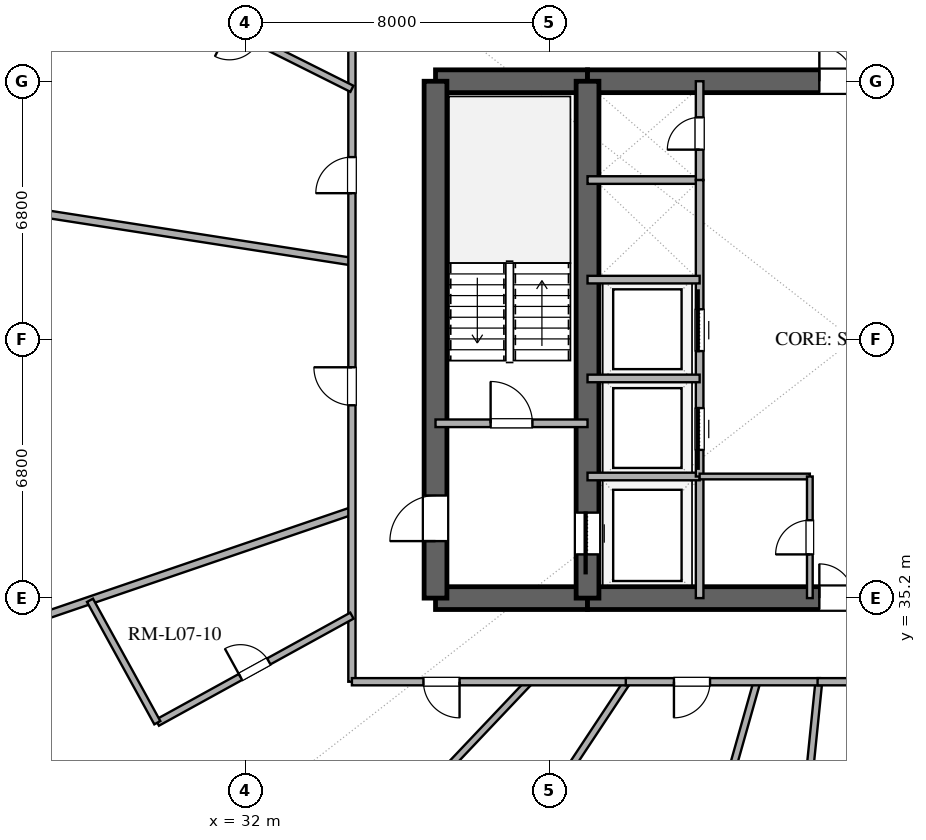
"""IFC4 building model, lengths in metres.
Left out: names, types, materials, properties, quantities, classifications, styles, units other than length and angle.
Written with IfcOpenShell. Run it as: python <this file> out.ifc"""

import sys

from ifc_helpers import new_model, si_unit, direction, frame, frame_2d, origin, place, context, subcontext, project, spatial, rectangle, extrude, element, fill, save


model = new_model("IFC4")
c1 = context("Model", 3, precision=1e-05, world=origin(), true_north=direction((0.0, 1.0)))
c2 = subcontext(c1, "Body", "Model", "MODEL_VIEW")
j1 = project(units=[si_unit("LENGTHUNIT", "METRE"), si_unit("PLANEANGLEUNIT", "RADIAN")], contexts=[c1])
p1 = place(None, origin())
s1 = spatial("IfcSite", under=j1, at=p1, CompositionType="ELEMENT")
p2 = place(p1, origin())
s2 = spatial("IfcBuilding", under=s1, at=p2, CompositionType="ELEMENT")
p3 = place(p2, frame((0.0, 0.0, 35.4)))
s3 = spatial("IfcBuildingStorey", under=s2, at=p3, CompositionType="ELEMENT", Elevation=35.4)
p4 = place(p3, frame((37.0, 35.2, 0.0), z_axis=(0.0, 0.0, 1.0), x_axis=(1.0, 0.0, 0.0)))
e1 = element("IfcWall", 1, at=p4, inside=s3, PredefinedType="SHEAR", context=c2, shape_type="SweptSolid", body=[
    extrude(rectangle(XDim=4.0, YDim=0.6, at=frame_2d((2.0, 0.0))), origin(), (0.0, 0.0, 1.0), 3.38),
])
p5 = place(p3, frame((41.0, 35.2, 0.0), z_axis=(0.0, 0.0, 1.0), x_axis=(1.0, 0.0, 0.0)))
e2 = element("IfcWall", 2, at=p5, inside=s3, PredefinedType="SHEAR", context=c2, shape_type="SweptSolid", body=[
    extrude(rectangle(XDim=14.0, YDim=0.6, at=frame_2d((7.0, 0.0))), origin(), (0.0, 0.0, 1.0), 3.38),
])
p6 = place(p5, frame((6.1, 0.0, 0.0)))
e3 = element("IfcOpeningElement", 3, at=p6, cuts=e2, PredefinedType="OPENING", context=c2, shape_type="SweptSolid", body=[
    extrude(rectangle(XDim=1.8, YDim=2.25, at=frame_2d((0.9, 1.125))), frame((0.0, 0.31, 0.0), z_axis=(0.0, -1.0, 0.0), x_axis=(1.0, 0.0, 0.0)), (0.0, 0.0, 1.0), 0.62),
])
p7 = place(p3, frame((37.0, 48.8, 0.0), z_axis=(0.0, 0.0, 1.0), x_axis=(1.0, 0.0, 0.0)))
e4 = element("IfcWall", 4, at=p7, inside=s3, PredefinedType="SHEAR", context=c2, shape_type="SweptSolid", body=[
    extrude(rectangle(XDim=4.0, YDim=0.6, at=frame_2d((2.0, 0.0))), origin(), (0.0, 0.0, 1.0), 3.38),
])
p8 = place(p3, frame((41.0, 48.8, 0.0), z_axis=(0.0, 0.0, 1.0), x_axis=(1.0, 0.0, 0.0)))
e5 = element("IfcWall", 5, at=p8, inside=s3, PredefinedType="SHEAR", context=c2, shape_type="SweptSolid", body=[
    extrude(rectangle(XDim=14.0, YDim=0.6, at=frame_2d((7.0, 0.0))), origin(), (0.0, 0.0, 1.0), 3.38),
])
p9 = place(p8, frame((6.1, 0.0, 0.0)))
e6 = element("IfcOpeningElement", 6, at=p9, cuts=e5, PredefinedType="OPENING", context=c2, shape_type="SweptSolid", body=[
    extrude(rectangle(XDim=1.8, YDim=2.25, at=frame_2d((0.9, 1.125))), frame((0.0, 0.31, 0.0), z_axis=(0.0, -1.0, 0.0), x_axis=(1.0, 0.0, 0.0)), (0.0, 0.0, 1.0), 0.62),
])
p10 = place(p3, frame((37.0, 35.2, 0.0), z_axis=(0.0, 0.0, 1.0), x_axis=(0.0, 1.0, 0.0)))
e7 = element("IfcWall", 7, at=p10, inside=s3, PredefinedType="SHEAR", context=c2, shape_type="SweptSolid", body=[
    extrude(rectangle(XDim=13.6, YDim=0.6, at=frame_2d((6.8, 0.0))), origin(), (0.0, 0.0, 1.0), 3.38),
])
p11 = place(p10, frame((1.5, 0.0, 0.0)))
e8 = element("IfcOpeningElement", 8, at=p11, cuts=e7, PredefinedType="OPENING", context=c2, shape_type="SweptSolid", body=[
    extrude(rectangle(XDim=1.2, YDim=2.15, at=frame_2d((0.6, 1.075))), frame((0.0, 0.31, 0.0), z_axis=(0.0, -1.0, 0.0), x_axis=(1.0, 0.0, 0.0)), (0.0, 0.0, 1.0), 0.62),
])
p12 = place(p3, frame((41.0, 35.2, 0.0), z_axis=(0.0, 0.0, 1.0), x_axis=(0.0, 1.0, 0.0)))
e9 = element("IfcWall", 9, at=p12, inside=s3, PredefinedType="SHEAR", context=c2, shape_type="SweptSolid", body=[
    extrude(rectangle(XDim=13.6, YDim=0.6, at=frame_2d((6.8, 0.0))), origin(), (0.0, 0.0, 1.0), 3.38),
])
p13 = place(p12, frame((1.15, 0.0, 0.0)))
e10 = element("IfcOpeningElement", 10, at=p13, cuts=e9, PredefinedType="OPENING", context=c2, shape_type="SweptSolid", body=[
    extrude(rectangle(XDim=1.1, YDim=2.2, at=frame_2d((0.55, 1.1))), frame((0.0, 0.31, 0.0), z_axis=(0.0, -1.0, 0.0), x_axis=(1.0, 0.0, 0.0)), (0.0, 0.0, 1.0), 0.62),
])
p14 = place(p3, frame((37.0, 39.8, 0.0), z_axis=(0.0, 0.0, 1.0), x_axis=(1.0, 0.0, 0.0)))
e11 = element("IfcWall", 11, at=p14, inside=s3, PredefinedType="SOLIDWALL", context=c2, shape_type="SweptSolid", body=[
    extrude(rectangle(XDim=4.0, YDim=0.2, at=frame_2d((2.0, 0.0))), origin(), (0.0, 0.0, 1.0), 2.74),
])
p15 = place(p14, frame((1.45, 0.0, 0.0)))
e12 = element("IfcOpeningElement", 12, at=p15, cuts=e11, PredefinedType="OPENING", context=c2, shape_type="SweptSolid", body=[
    extrude(rectangle(XDim=1.1, YDim=2.15, at=frame_2d((0.55, 1.075))), frame((0.0, 0.11, 0.0), z_axis=(0.0, -1.0, 0.0), x_axis=(1.0, 0.0, 0.0)), (0.0, 0.0, 1.0), 0.22),
])
p16 = place(p3, frame((43.95, 35.2, 0.0), z_axis=(0.0, 0.0, 1.0), x_axis=(0.0, 1.0, 0.0)))
e13 = element("IfcWall", 13, at=p16, inside=s3, PredefinedType="SOLIDWALL", context=c2, shape_type="SweptSolid", body=[
    extrude(rectangle(XDim=3.2, YDim=0.2, at=frame_2d((1.6, 0.0))), origin(), (0.0, 0.0, 1.0), 2.74),
])
for number, where, z_axis, x_axis in (
    (14, (41.0, 38.4, 0.0), (0.0, 0.0, 1.0), (1.0, 0.0, 0.0)),
    (15, (41.0, 46.2, 0.0), (0.0, 0.0, 1.0), (1.0, 0.0, 0.0)),
):
    element("IfcWall", number, at=place(p3, frame(where, z_axis=z_axis, x_axis=x_axis)), inside=s3, PredefinedType="SOLIDWALL", context=c2, shape_type="SweptSolid", body=[
        extrude(rectangle(XDim=2.95, YDim=0.2, at=frame_2d((1.475, 0.0))), origin(), (0.0, 0.0, 1.0), 2.74),
    ])
p17 = place(p3, frame((43.95, 46.2, 0.0), z_axis=(0.0, 0.0, 1.0), x_axis=(0.0, 1.0, 0.0)))
e16 = element("IfcWall", 16, at=p17, inside=s3, PredefinedType="SOLIDWALL", context=c2, shape_type="SweptSolid", body=[
    extrude(rectangle(XDim=2.6, YDim=0.2, at=frame_2d((1.3, 0.0))), origin(), (0.0, 0.0, 1.0), 2.74),
])
p18 = place(p17, frame((0.8, 0.0, 0.0)))
e17 = element("IfcOpeningElement", 17, at=p18, cuts=e16, PredefinedType="OPENING", context=c2, shape_type="SweptSolid", body=[
    extrude(rectangle(XDim=0.85, YDim=2.15, at=frame_2d((0.425, 1.075))), frame((0.0, 0.11, 0.0), z_axis=(0.0, -1.0, 0.0), x_axis=(1.0, 0.0, 0.0)), (0.0, 0.0, 1.0), 0.22),
])
p19 = place(p3, frame((43.95, 38.4, 0.0), z_axis=(0.0, 0.0, 1.0), x_axis=(0.0, 1.0, 0.0)))
e18 = element("IfcWall", 18, at=p19, inside=s3, PredefinedType="SOLIDWALL", context=c2, shape_type="SweptSolid", body=[
    extrude(rectangle(XDim=7.8, YDim=0.2, at=frame_2d((3.9, 0.0))), origin(), (0.0, 0.0, 1.0), 2.74),
])
p20 = place(p19, frame((0.7, 0.0, 0.0)))
e19 = element("IfcOpeningElement", 19, at=p20, cuts=e18, PredefinedType="OPENING", context=c2, shape_type="SweptSolid", body=[
    extrude(rectangle(XDim=1.1, YDim=2.2, at=frame_2d((0.55, 1.1))), frame((0.0, 0.11, 0.0), z_axis=(0.0, -1.0, 0.0), x_axis=(1.0, 0.0, 0.0)), (0.0, 0.0, 1.0), 0.22),
])
p21 = place(p19, frame((3.3, 0.0, 0.0)))
e20 = element("IfcOpeningElement", 20, at=p21, cuts=e18, PredefinedType="OPENING", context=c2, shape_type="SweptSolid", body=[
    extrude(rectangle(XDim=1.1, YDim=2.2, at=frame_2d((0.55, 1.1))), frame((0.0, 0.11, 0.0), z_axis=(0.0, -1.0, 0.0), x_axis=(1.0, 0.0, 0.0)), (0.0, 0.0, 1.0), 0.22),
])
for number, where, z_axis, x_axis in (
    (21, (41.0, 40.98, 0.0), (0.0, 0.0, 1.0), (1.0, 0.0, 0.0)),
    (22, (41.0, 43.58, 0.0), (0.0, 0.0, 1.0), (1.0, 0.0, 0.0)),
):
    element("IfcWall", number, at=place(p3, frame(where, z_axis=z_axis, x_axis=x_axis)), inside=s3, PredefinedType="SOLIDWALL", context=c2, shape_type="SweptSolid", body=[
        extrude(rectangle(XDim=2.95, YDim=0.2, at=frame_2d((1.475, 0.0))), origin(), (0.0, 0.0, 1.0), 2.74),
    ])
p22 = place(p3, frame((43.95, 38.4, 0.0), z_axis=(0.0, 0.0, 1.0), x_axis=(1.0, 0.0, 0.0)))
e23 = element("IfcWall", 23, at=p22, inside=s3, PredefinedType="PARTITIONING", context=c2, shape_type="SweptSolid", body=[
    extrude(rectangle(XDim=2.9, YDim=0.15, at=frame_2d((1.45, 0.0))), origin(), (0.0, 0.0, 1.0), 2.74),
])
p23 = place(p3, frame((46.85, 35.2, 0.0), z_axis=(0.0, 0.0, 1.0), x_axis=(0.0, 1.0, 0.0)))
e24 = element("IfcWall", 24, at=p23, inside=s3, PredefinedType="PARTITIONING", context=c2, shape_type="SweptSolid", body=[
    extrude(rectangle(XDim=3.2, YDim=0.15, at=frame_2d((1.6, 0.0))), origin(), (0.0, 0.0, 1.0), 2.74),
])
p24 = place(p23, frame((1.15, 0.0, 0.0)))
e25 = element("IfcOpeningElement", 25, at=p24, cuts=e24, PredefinedType="OPENING", context=c2, shape_type="SweptSolid", body=[
    extrude(rectangle(XDim=0.9, YDim=2.15, at=frame_2d((0.45, 1.075))), frame((0.0, 0.085, 0.0), z_axis=(0.0, -1.0, 0.0), x_axis=(1.0, 0.0, 0.0)), (0.0, 0.0, 1.0), 0.17),
])
p25 = place(p3, frame((18.253, 46.63, 0.0), z_axis=(0.0, 0.0, 1.0), x_axis=(0.988105936892, -0.153774697134, 0.0)))
e26 = element("IfcWall", 26, at=p25, inside=s3, PredefinedType="PARTITIONING", context=c2, shape_type="SweptSolid", body=[
    extrude(rectangle(XDim=16.747, YDim=0.2, at=frame_2d((8.373, 0.0))), origin(), (0.0, 0.0, 1.0), 2.74),
])
p26 = place(p3, frame((34.8, 37.494, 0.0), z_axis=(0.0, 0.0, 1.0), x_axis=(-0.946390715793, -0.32302416792, 0.0)))
e27 = element("IfcWall", 27, at=p26, inside=s3, PredefinedType="PARTITIONING", context=c2, shape_type="SweptSolid", body=[
    extrude(rectangle(XDim=15.952, YDim=0.2, at=frame_2d((7.976, 0.0))), origin(), (0.0, 0.0, 1.0), 2.74),
])
p27 = place(p3, frame((42.045, 33.0, 0.0), z_axis=(0.0, 0.0, 1.0), x_axis=(-0.551832909025, -0.833954699319, 0.0)))
e28 = element("IfcWall", 28, at=p27, inside=s3, PredefinedType="PLUMBINGWALL", context=c2, shape_type="SweptSolid", body=[
    extrude(rectangle(XDim=6.905, YDim=0.18, at=frame_2d((3.452, 0.0))), origin(), (0.0, 0.0, 1.0), 2.74),
])
p28 = place(p27, frame((3.027, 0.0, 0.0)))
e29 = element("IfcOpeningElement", 29, at=p28, cuts=e28, PredefinedType="OPENING", context=c2, shape_type="SweptSolid", body=[
    extrude(rectangle(XDim=0.85, YDim=2.1, at=frame_2d((0.425, 1.05))), frame((0.0, 0.1, 0.0), z_axis=(0.0, -1.0, 0.0), x_axis=(1.0, 0.0, 0.0)), (0.0, 0.0, 1.0), 0.2),
])
p29 = place(p3, frame((47.086, 33.0, 0.0), z_axis=(0.0, 0.0, 1.0), x_axis=(-0.101019373019, -0.994884458756, 0.0)))
e30 = element("IfcWall", 30, at=p29, inside=s3, PredefinedType="PLUMBINGWALL", context=c2, shape_type="SweptSolid", body=[
    extrude(rectangle(XDim=6.714, YDim=0.18, at=frame_2d((3.357, 0.0))), origin(), (0.0, 0.0, 1.0), 2.74),
])
p30 = place(p29, frame((2.932, 0.0, 0.0)))
e31 = element("IfcOpeningElement", 31, at=p30, cuts=e30, PredefinedType="OPENING", context=c2, shape_type="SweptSolid", body=[
    extrude(rectangle(XDim=0.85, YDim=2.1, at=frame_2d((0.425, 1.05))), frame((0.0, 0.1, 0.0), z_axis=(0.0, -1.0, 0.0), x_axis=(1.0, 0.0, 0.0)), (0.0, 0.0, 1.0), 0.2),
])
p31 = place(p3, frame((43.651, 26.601, 0.0), z_axis=(0.0, 0.0, 1.0), x_axis=(0.271761873698, 0.962364527611, 0.0)))
e32 = element("IfcWall", 32, at=p31, inside=s3, PredefinedType="PLUMBINGWALL", context=c2, shape_type="SweptSolid", body=[
    extrude(rectangle(XDim=6.65, YDim=0.18, at=frame_2d((3.325, 0.0))), origin(), (0.0, 0.0, 1.0), 2.74),
])
p32 = place(p3, frame((34.8, 33.0, 0.0), z_axis=(0.0, 0.0, 1.0), x_axis=(0.0, 1.0, 0.0)))
e33 = element("IfcWall", 33, at=p32, inside=s3, PredefinedType="PARTITIONING", context=c2, shape_type="SweptSolid", body=[
    extrude(rectangle(XDim=18.0, YDim=0.19, at=frame_2d((9.0, 0.0))), origin(), (0.0, 0.0, 1.0), 2.74),
])
p33 = place(p32, frame((7.274, 0.0, 0.0)))
e34 = element("IfcOpeningElement", 34, at=p33, cuts=e33, PredefinedType="OPENING", context=c2, shape_type="SweptSolid", body=[
    extrude(rectangle(XDim=1.0, YDim=2.2, at=frame_2d((0.5, 1.1))), frame((0.0, 0.105, 0.0), z_axis=(0.0, -1.0, 0.0), x_axis=(1.0, 0.0, 0.0)), (0.0, 0.0, 1.0), 0.21),
])
p34 = place(p32, frame((12.854, 0.0, 0.0)))
e35 = element("IfcOpeningElement", 35, at=p34, cuts=e33, PredefinedType="OPENING", context=c2, shape_type="SweptSolid", body=[
    extrude(rectangle(XDim=0.95, YDim=2.15, at=frame_2d((0.475, 1.075))), frame((0.0, 0.105, 0.0), z_axis=(0.0, -1.0, 0.0), x_axis=(1.0, 0.0, 0.0)), (0.0, 0.0, 1.0), 0.21),
])
p35 = place(p3, frame((34.8, 48.601, 0.0), z_axis=(0.0, 0.0, 1.0), x_axis=(-0.894404156958, 0.447259660617, 0.0)))
e36 = element("IfcWall", 36, at=p35, inside=s3, PredefinedType="PLUMBINGWALL", context=c2, shape_type="SweptSolid", body=[
    extrude(rectangle(XDim=6.36, YDim=0.18, at=frame_2d((3.18, 0.0))), origin(), (0.0, 0.0, 1.0), 2.74),
])
p36 = place(p35, frame((2.755, 0.0, 0.0)))
e37 = element("IfcOpeningElement", 37, at=p36, cuts=e36, PredefinedType="OPENING", context=c2, shape_type="SweptSolid", body=[
    extrude(rectangle(XDim=0.85, YDim=2.1, at=frame_2d((0.425, 1.05))), frame((0.0, 0.1, 0.0), z_axis=(0.0, -1.0, 0.0), x_axis=(1.0, 0.0, 0.0)), (0.0, 0.0, 1.0), 0.2),
])
p37 = place(p3, frame((29.679, 31.922, 0.0), z_axis=(0.0, 0.0, 1.0), x_axis=(0.876185038284, 0.481974873503, 0.0)))
e38 = element("IfcWall", 38, at=p37, inside=s3, PredefinedType="PLUMBINGWALL", context=c2, shape_type="SweptSolid", body=[
    extrude(rectangle(XDim=5.844, YDim=0.18, at=frame_2d((2.922, 0.0))), origin(), (0.0, 0.0, 1.0), 2.74),
])
p38 = place(p37, frame((2.497, 0.0, 0.0)))
e39 = element("IfcOpeningElement", 39, at=p38, cuts=e38, PredefinedType="OPENING", context=c2, shape_type="SweptSolid", body=[
    extrude(rectangle(XDim=0.85, YDim=2.1, at=frame_2d((0.425, 1.05))), frame((0.0, 0.1, 0.0), z_axis=(0.0, -1.0, 0.0), x_axis=(1.0, 0.0, 0.0)), (0.0, 0.0, 1.0), 0.2),
])
p39 = place(p3, frame((35.64, 28.958, 0.0), z_axis=(0.0, 0.0, 1.0), x_axis=(0.687867465085, 0.725836311077, 0.0)))
e40 = element("IfcWall", 40, at=p39, inside=s3, PredefinedType="PLUMBINGWALL", context=c2, shape_type="SweptSolid", body=[
    extrude(rectangle(XDim=5.568, YDim=0.18, at=frame_2d((2.784, 0.0))), origin(), (0.0, 0.0, 1.0), 2.74),
])
p40 = place(p3, frame((42.083, 33.0, 0.0), z_axis=(0.0, 0.0, 1.0), x_axis=(-1.0, 0.0, 0.0)))
e41 = element("IfcWall", 41, at=p40, inside=s3, PredefinedType="PARTITIONING", context=c2, shape_type="SweptSolid", body=[
    extrude(rectangle(XDim=7.283, YDim=0.19, at=frame_2d((3.642, 0.0))), origin(), (0.0, 0.0, 1.0), 2.74),
])
p41 = place(p40, frame((4.451, 0.0, 0.0)))
e42 = element("IfcOpeningElement", 42, at=p41, cuts=e41, PredefinedType="OPENING", context=c2, shape_type="SweptSolid", body=[
    extrude(rectangle(XDim=0.95, YDim=2.15, at=frame_2d((0.475, 1.075))), frame((0.0, 0.105, 0.0), z_axis=(0.0, -1.0, 0.0), x_axis=(1.0, 0.0, 0.0)), (0.0, 0.0, 1.0), 0.21),
])
p42 = place(p3, frame((27.908, 35.142, 0.0), z_axis=(0.0, 0.0, 1.0), x_axis=(0.481967195945, -0.876189261537, 0.0)))
e43 = element("IfcWall", 43, at=p42, inside=s3, PredefinedType="PLUMBINGWALL", context=c2, shape_type="SweptSolid", body=[
    extrude(rectangle(XDim=3.676, YDim=0.18, at=frame_2d((1.838, 0.0))), origin(), (0.0, 0.0, 1.0), 2.74),
])
p43 = place(p3, frame((47.118, 33.0, 0.0), z_axis=(0.0, 0.0, 1.0), x_axis=(-1.0, 0.0, 0.0)))
e44 = element("IfcWall", 44, at=p43, inside=s3, PredefinedType="PARTITIONING", context=c2, shape_type="SweptSolid", body=[
    extrude(rectangle(XDim=5.112, YDim=0.19, at=frame_2d((2.556, 0.0))), origin(), (0.0, 0.0, 1.0), 2.74),
])
p44 = place(p43, frame((2.894, 0.0, 0.0)))
e45 = element("IfcOpeningElement", 45, at=p44, cuts=e44, PredefinedType="OPENING", context=c2, shape_type="SweptSolid", body=[
    extrude(rectangle(XDim=0.95, YDim=2.15, at=frame_2d((0.475, 1.075))), frame((0.0, 0.105, 0.0), z_axis=(0.0, -1.0, 0.0), x_axis=(1.0, 0.0, 0.0)), (0.0, 0.0, 1.0), 0.21),
])
p45 = place(p3, frame((49.933, 33.0, 0.0), z_axis=(0.0, 0.0, 1.0), x_axis=(-1.0, 0.0, 0.0)))
e46 = element("IfcWall", 46, at=p45, inside=s3, PredefinedType="PARTITIONING", context=c2, shape_type="SweptSolid", body=[
    extrude(rectangle(XDim=2.879, YDim=0.19, at=frame_2d((1.44, 0.0))), origin(), (0.0, 0.0, 1.0), 2.74),
])
p46 = place(p45, frame((0.965, 0.0, 0.0)))
e47 = element("IfcOpeningElement", 47, at=p46, cuts=e46, PredefinedType="OPENING", context=c2, shape_type="SweptSolid", body=[
    extrude(rectangle(XDim=0.95, YDim=2.15, at=frame_2d((0.475, 1.075))), frame((0.0, 0.105, 0.0), z_axis=(0.0, -1.0, 0.0), x_axis=(1.0, 0.0, 0.0)), (0.0, 0.0, 1.0), 0.21),
])
p47 = place(p13, origin())
e48 = element("IfcDoor", 48, at=p47, inside=s3, OperationType="SLIDING_TO_LEFT", PredefinedType="DOOR", context=c2, shape_type="SweptSolid", body=[
    extrude(rectangle(XDim=1.1, YDim=2.2, at=frame_2d((0.55, 1.1))), frame((0.0, 0.025, 0.0), z_axis=(0.0, -1.0, 0.0), x_axis=(1.0, 0.0, 0.0)), (0.0, 0.0, 1.0), 0.05),
])
fill(e10, e48)
p48 = place(p11, origin())
e49 = element("IfcDoor", 49, at=p48, inside=s3, OperationType="SINGLE_SWING_LEFT", PredefinedType="DOOR", context=c2, shape_type="SweptSolid", body=[
    extrude(rectangle(XDim=1.2, YDim=2.15, at=frame_2d((0.6, 1.075))), frame((0.0, 0.025, 0.0), z_axis=(0.0, -1.0, 0.0), x_axis=(1.0, 0.0, 0.0)), (0.0, 0.0, 1.0), 0.05),
])
fill(e8, e49)
p49 = place(p6, origin())
e50 = element("IfcDoor", 50, at=p49, inside=s3, OperationType="DOUBLE_DOOR_SINGLE_SWING", PredefinedType="DOOR", context=c2, shape_type="SweptSolid", body=[
    extrude(rectangle(XDim=1.8, YDim=2.25, at=frame_2d((0.9, 1.125))), frame((0.0, 0.025, 0.0), z_axis=(0.0, -1.0, 0.0), x_axis=(1.0, 0.0, 0.0)), (0.0, 0.0, 1.0), 0.05),
])
fill(e3, e50)
p50 = place(p9, origin())
e51 = element("IfcDoor", 51, at=p50, inside=s3, OperationType="DOUBLE_DOOR_SINGLE_SWING", PredefinedType="DOOR", context=c2, shape_type="SweptSolid", body=[
    extrude(rectangle(XDim=1.8, YDim=2.25, at=frame_2d((0.9, 1.125))), frame((0.0, 0.025, 0.0), z_axis=(0.0, -1.0, 0.0), x_axis=(1.0, 0.0, 0.0)), (0.0, 0.0, 1.0), 0.05),
])
fill(e6, e51)
p51 = place(p15, origin())
e52 = element("IfcDoor", 52, at=p51, inside=s3, OperationType="SINGLE_SWING_LEFT", PredefinedType="DOOR", context=c2, shape_type="SweptSolid", body=[
    extrude(rectangle(XDim=1.1, YDim=2.15, at=frame_2d((0.55, 1.075))), frame((0.0, 0.025, 0.0), z_axis=(0.0, -1.0, 0.0), x_axis=(1.0, 0.0, 0.0)), (0.0, 0.0, 1.0), 0.05),
])
fill(e12, e52)
p52 = place(p18, origin())
e53 = element("IfcDoor", 53, at=p52, inside=s3, OperationType="SINGLE_SWING_LEFT", PredefinedType="DOOR", context=c2, shape_type="SweptSolid", body=[
    extrude(rectangle(XDim=0.85, YDim=2.15, at=frame_2d((0.425, 1.075))), frame((0.0, 0.025, 0.0), z_axis=(0.0, -1.0, 0.0), x_axis=(1.0, 0.0, 0.0)), (0.0, 0.0, 1.0), 0.05),
])
fill(e17, e53)
p53 = place(p20, origin())
e54 = element("IfcDoor", 54, at=p53, inside=s3, OperationType="SLIDING_TO_LEFT", PredefinedType="DOOR", context=c2, shape_type="SweptSolid", body=[
    extrude(rectangle(XDim=1.1, YDim=2.2, at=frame_2d((0.55, 1.1))), frame((0.0, 0.025, 0.0), z_axis=(0.0, -1.0, 0.0), x_axis=(1.0, 0.0, 0.0)), (0.0, 0.0, 1.0), 0.05),
])
fill(e19, e54)
p54 = place(p21, origin())
e55 = element("IfcDoor", 55, at=p54, inside=s3, OperationType="SLIDING_TO_RIGHT", PredefinedType="DOOR", context=c2, shape_type="SweptSolid", body=[
    extrude(rectangle(XDim=1.1, YDim=2.2, at=frame_2d((0.55, 1.1))), frame((0.0, 0.025, 0.0), z_axis=(0.0, -1.0, 0.0), x_axis=(1.0, 0.0, 0.0)), (0.0, 0.0, 1.0), 0.05),
])
fill(e20, e55)
p55 = place(p24, origin())
e56 = element("IfcDoor", 56, at=p55, inside=s3, OperationType="SINGLE_SWING_LEFT", PredefinedType="DOOR", context=c2, shape_type="SweptSolid", body=[
    extrude(rectangle(XDim=0.9, YDim=2.15, at=frame_2d((0.45, 1.075))), frame((0.0, 0.025, 0.0), z_axis=(0.0, -1.0, 0.0), x_axis=(1.0, 0.0, 0.0)), (0.0, 0.0, 1.0), 0.05),
])
fill(e25, e56)
p56 = place(p33, origin())
e57 = element("IfcDoor", 57, at=p56, inside=s3, OperationType="SINGLE_SWING_RIGHT", PredefinedType="DOOR", context=c2, shape_type="SweptSolid", body=[
    extrude(rectangle(XDim=1.0, YDim=2.2, at=frame_2d((0.5, 1.1))), frame((0.0, 0.025, 0.0), z_axis=(0.0, -1.0, 0.0), x_axis=(1.0, 0.0, 0.0)), (0.0, 0.0, 1.0), 0.05),
])
fill(e34, e57)
p57 = place(p34, origin())
e58 = element("IfcDoor", 58, at=p57, inside=s3, OperationType="SINGLE_SWING_LEFT", PredefinedType="DOOR", context=c2, shape_type="SweptSolid", body=[
    extrude(rectangle(XDim=0.95, YDim=2.15, at=frame_2d((0.475, 1.075))), frame((0.0, 0.025, 0.0), z_axis=(0.0, -1.0, 0.0), x_axis=(1.0, 0.0, 0.0)), (0.0, 0.0, 1.0), 0.05),
])
fill(e35, e58)
p58 = place(p38, origin())
e59 = element("IfcDoor", 59, at=p58, inside=s3, OperationType="SINGLE_SWING_LEFT", PredefinedType="DOOR", context=c2, shape_type="SweptSolid", body=[
    extrude(rectangle(XDim=0.85, YDim=2.1, at=frame_2d((0.425, 1.05))), frame((0.0, 0.025, 0.0), z_axis=(0.0, -1.0, 0.0), x_axis=(1.0, 0.0, 0.0)), (0.0, 0.0, 1.0), 0.05),
])
fill(e39, e59)
p59 = place(p41, origin())
e60 = element("IfcDoor", 60, at=p59, inside=s3, OperationType="SINGLE_SWING_LEFT", PredefinedType="DOOR", context=c2, shape_type="SweptSolid", body=[
    extrude(rectangle(XDim=0.95, YDim=2.15, at=frame_2d((0.475, 1.075))), frame((0.0, 0.025, 0.0), z_axis=(0.0, -1.0, 0.0), x_axis=(1.0, 0.0, 0.0)), (0.0, 0.0, 1.0), 0.05),
])
fill(e42, e60)
p60 = place(p44, origin())
e61 = element("IfcDoor", 61, at=p60, inside=s3, OperationType="SINGLE_SWING_RIGHT", PredefinedType="DOOR", context=c2, shape_type="SweptSolid", body=[
    extrude(rectangle(XDim=0.95, YDim=2.15, at=frame_2d((0.475, 1.075))), frame((0.0, 0.025, 0.0), z_axis=(0.0, -1.0, 0.0), x_axis=(1.0, 0.0, 0.0)), (0.0, 0.0, 1.0), 0.05),
])
fill(e45, e61)
save(model, sys.argv[1])
